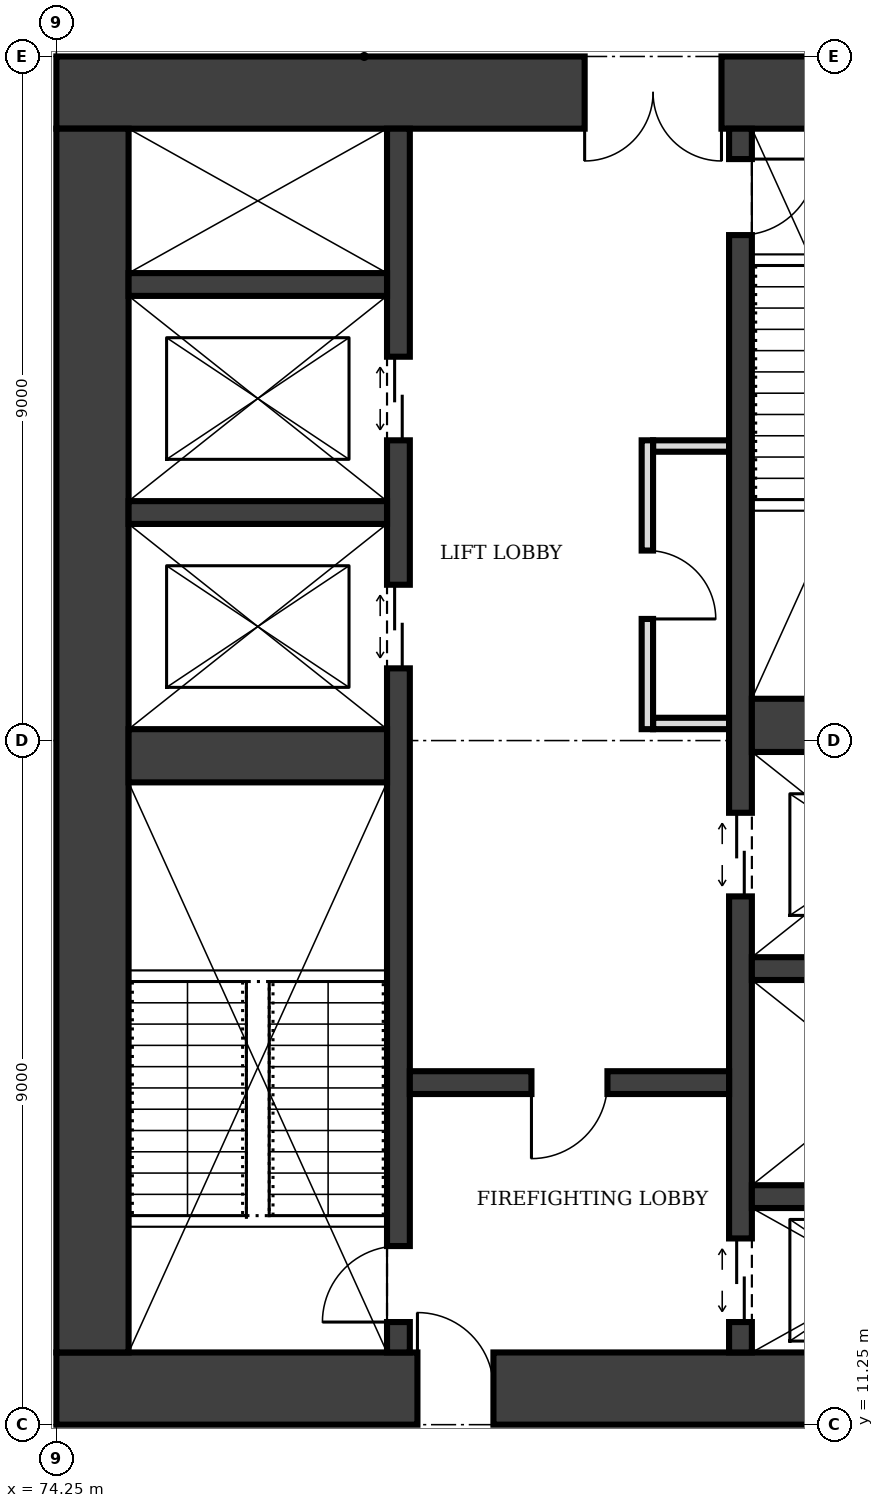
"""IFC4 building model, lengths in metres.
Left out: names, types, materials, properties, quantities, classifications, styles, units other than length and angle.
Written with IfcOpenShell. Run it as: python <this file> out.ifc"""

import sys

from ifc_helpers import new_model, si_unit, direction, frame, frame_2d, origin, place, context, subcontext, project, spatial, rectangle, extrude, element, fill, save


model = new_model("IFC4")
c1 = context("Model", 3, precision=1e-05, world=origin(), true_north=direction((0.0, 1.0)))
c2 = subcontext(c1, "Body", "Model", "MODEL_VIEW")
j1 = project(units=[si_unit("LENGTHUNIT", "METRE"), si_unit("PLANEANGLEUNIT", "RADIAN")], contexts=[c1])
p1 = place(None, origin())
s1 = spatial("IfcSite", under=j1, at=p1, CompositionType="ELEMENT")
p2 = place(p1, origin())
s2 = spatial("IfcBuilding", under=s1, at=p2, CompositionType="ELEMENT")
p3 = place(p2, frame((0.0, 0.0, 53.0)))
s3 = spatial("IfcBuildingStorey", under=s2, at=p3, CompositionType="ELEMENT", Elevation=53.0)
p4 = place(p3, frame((74.25, 11.725, 0.0), z_axis=(0.0, 0.0, 1.0), x_axis=(1.0, 0.0, 0.0)))
e1 = element("IfcWall", 1, at=p4, inside=s3, PredefinedType="SHEAR", context=c2, shape_type="SweptSolid", body=[
    extrude(rectangle(XDim=13.5, YDim=0.95, at=frame_2d((6.75, 0.0))), origin(), (0.0, 0.0, 1.0), 4.0),
])
p5 = place(p4, frame((4.75, 0.0, 0.0)))
e2 = element("IfcOpeningElement", 2, at=p5, cuts=e1, PredefinedType="OPENING", context=c2, shape_type="SweptSolid", body=[
    extrude(rectangle(XDim=1.0, YDim=2.1, at=frame_2d((0.5, 1.05))), frame((0.0, 0.485, 0.0), z_axis=(0.0, -1.0, 0.0), x_axis=(1.0, 0.0, 0.0)), (0.0, 0.0, 1.0), 0.97),
])
p6 = place(p3, frame((87.75, 28.775, 0.0), z_axis=(0.0, 0.0, 1.0), x_axis=(-1.0, 0.0, 0.0)))
e3 = element("IfcWall", 3, at=p6, inside=s3, PredefinedType="SHEAR", context=c2, shape_type="SweptSolid", body=[
    extrude(rectangle(XDim=13.5, YDim=0.95, at=frame_2d((6.75, 0.0))), origin(), (0.0, 0.0, 1.0), 4.0),
])
p7 = place(p6, frame((4.75, 0.0, 0.0)))
e4 = element("IfcOpeningElement", 4, at=p7, cuts=e3, PredefinedType="OPENING", context=c2, shape_type="SweptSolid", body=[
    extrude(rectangle(XDim=1.8, YDim=2.1, at=frame_2d((0.9, 1.05))), frame((0.0, 0.485, 0.0), z_axis=(0.0, -1.0, 0.0), x_axis=(1.0, 0.0, 0.0)), (0.0, 0.0, 1.0), 0.97),
])
p8 = place(p3, frame((74.725, 28.3, 0.0), z_axis=(0.0, 0.0, 1.0), x_axis=(0.0, -1.0, 0.0)))
e5 = element("IfcWall", 5, at=p8, inside=s3, PredefinedType="SHEAR", context=c2, shape_type="SweptSolid", body=[
    extrude(rectangle(XDim=16.1, YDim=0.95, at=frame_2d((8.05, 0.0))), origin(), (0.0, 0.0, 1.0), 4.0),
])
p9 = place(p3, frame((78.75, 12.2, 0.0), z_axis=(0.0, 0.0, 1.0), x_axis=(0.0, 1.0, 0.0)))
e6 = element("IfcWall", 6, at=p9, inside=s3, PredefinedType="SHEAR", context=c2, shape_type="SweptSolid", body=[
    extrude(rectangle(XDim=16.1, YDim=0.3, at=frame_2d((8.05, 0.0))), origin(), (0.0, 0.0, 1.0), 4.0),
])
p10 = place(p9, frame((0.4, 0.0, 0.0)))
e7 = element("IfcOpeningElement", 7, at=p10, cuts=e6, PredefinedType="OPENING", context=c2, shape_type="SweptSolid", body=[
    extrude(rectangle(XDim=1.0, YDim=2.1, at=frame_2d((0.5, 1.05))), frame((0.0, 0.16, 0.0), z_axis=(0.0, -1.0, 0.0), x_axis=(1.0, 0.0, 0.0)), (0.0, 0.0, 1.0), 0.32),
])
p11 = place(p9, frame((9.0, 0.0, 0.0)))
e8 = element("IfcOpeningElement", 8, at=p11, cuts=e6, PredefinedType="OPENING", context=c2, shape_type="SweptSolid", body=[
    extrude(rectangle(XDim=1.1, YDim=2.1, at=frame_2d((0.55, 1.05))), frame((0.0, 0.16, 0.0), z_axis=(0.0, -1.0, 0.0), x_axis=(1.0, 0.0, 0.0)), (0.0, 0.0, 1.0), 0.32),
])
p12 = place(p9, frame((12.0, 0.0, 0.0)))
e9 = element("IfcOpeningElement", 9, at=p12, cuts=e6, PredefinedType="OPENING", context=c2, shape_type="SweptSolid", body=[
    extrude(rectangle(XDim=1.1, YDim=2.1, at=frame_2d((0.55, 1.05))), frame((0.0, 0.16, 0.0), z_axis=(0.0, -1.0, 0.0), x_axis=(1.0, 0.0, 0.0)), (0.0, 0.0, 1.0), 0.32),
])
p13 = place(p3, frame((83.25, 12.2, 0.0), z_axis=(0.0, 0.0, 1.0), x_axis=(0.0, 1.0, 0.0)))
e10 = element("IfcWall", 10, at=p13, inside=s3, PredefinedType="SHEAR", context=c2, shape_type="SweptSolid", body=[
    extrude(rectangle(XDim=16.1, YDim=0.3, at=frame_2d((8.05, 0.0))), origin(), (0.0, 0.0, 1.0), 4.0),
])
p14 = place(p13, frame((14.7, 0.0, 0.0)))
e11 = element("IfcOpeningElement", 11, at=p14, cuts=e10, PredefinedType="OPENING", context=c2, shape_type="SweptSolid", body=[
    extrude(rectangle(XDim=1.0, YDim=2.1, at=frame_2d((0.5, 1.05))), frame((0.0, 0.16, 0.0), z_axis=(0.0, -1.0, 0.0), x_axis=(1.0, 0.0, 0.0)), (0.0, 0.0, 1.0), 0.32),
])
p15 = place(p13, frame((0.4, 0.0, 0.0)))
e12 = element("IfcOpeningElement", 12, at=p15, cuts=e10, PredefinedType="OPENING", context=c2, shape_type="SweptSolid", body=[
    extrude(rectangle(XDim=1.1, YDim=2.1, at=frame_2d((0.55, 1.05))), frame((0.0, 0.16, 0.0), z_axis=(0.0, -1.0, 0.0), x_axis=(1.0, 0.0, 0.0)), (0.0, 0.0, 1.0), 0.32),
])
p16 = place(p13, frame((6.0, 0.0, 0.0)))
e13 = element("IfcOpeningElement", 13, at=p16, cuts=e10, PredefinedType="OPENING", context=c2, shape_type="SweptSolid", body=[
    extrude(rectangle(XDim=1.1, YDim=2.1, at=frame_2d((0.55, 1.05))), frame((0.0, 0.16, 0.0), z_axis=(0.0, -1.0, 0.0), x_axis=(1.0, 0.0, 0.0)), (0.0, 0.0, 1.0), 0.32),
])
p17 = place(p3, frame((75.2, 20.05, 0.0), z_axis=(0.0, 0.0, 1.0), x_axis=(1.0, 0.0, 0.0)))
e14 = element("IfcWall", 14, at=p17, inside=s3, PredefinedType="SHEAR", context=c2, shape_type="SweptSolid", body=[
    extrude(rectangle(XDim=3.4, YDim=0.7, at=frame_2d((1.7, 0.0))), origin(), (0.0, 0.0, 1.0), 4.0),
])
p18 = place(p3, frame((78.9, 15.75, 0.0), z_axis=(0.0, 0.0, 1.0), x_axis=(1.0, 0.0, 0.0)))
e15 = element("IfcWall", 15, at=p18, inside=s3, PredefinedType="SHEAR", context=c2, shape_type="SweptSolid", body=[
    extrude(rectangle(XDim=4.2, YDim=0.3, at=frame_2d((2.1, 0.0))), origin(), (0.0, 0.0, 1.0), 4.0),
])
p19 = place(p18, frame((1.6, 0.0, 0.0)))
e16 = element("IfcOpeningElement", 16, at=p19, cuts=e15, PredefinedType="OPENING", context=c2, shape_type="SweptSolid", body=[
    extrude(rectangle(XDim=1.0, YDim=2.1, at=frame_2d((0.5, 1.05))), frame((0.0, 0.16, 0.0), z_axis=(0.0, -1.0, 0.0), x_axis=(1.0, 0.0, 0.0)), (0.0, 0.0, 1.0), 0.32),
])
for number, where, z_axis, x_axis in (
    (17, (83.4, 14.25, 0.0), (0.0, 0.0, 1.0), (1.0, 0.0, 0.0)),
    (18, (83.4, 17.25, 0.0), (0.0, 0.0, 1.0), (1.0, 0.0, 0.0)),
):
    element("IfcWall", number, at=place(p3, frame(where, z_axis=z_axis, x_axis=x_axis)), inside=s3, PredefinedType="SHEAR", context=c2, shape_type="SweptSolid", body=[
        extrude(rectangle(XDim=3.4, YDim=0.3, at=frame_2d((1.7, 0.0))), origin(), (0.0, 0.0, 1.0), 4.0),
    ])
p20 = place(p3, frame((83.4, 20.45, 0.0), z_axis=(0.0, 0.0, 1.0), x_axis=(1.0, 0.0, 0.0)))
e19 = element("IfcWall", 19, at=p20, inside=s3, PredefinedType="SHEAR", context=c2, shape_type="SweptSolid", body=[
    extrude(rectangle(XDim=3.4, YDim=0.7, at=frame_2d((1.7, 0.0))), origin(), (0.0, 0.0, 1.0), 4.0),
])
for number, where, z_axis, x_axis in (
    (20, (75.2, 23.25, 0.0), (0.0, 0.0, 1.0), (1.0, 0.0, 0.0)),
    (21, (75.2, 26.25, 0.0), (0.0, 0.0, 1.0), (1.0, 0.0, 0.0)),
):
    element("IfcWall", number, at=place(p3, frame(where, z_axis=z_axis, x_axis=x_axis)), inside=s3, PredefinedType="SHEAR", context=c2, shape_type="SweptSolid", body=[
        extrude(rectangle(XDim=3.4, YDim=0.3, at=frame_2d((1.7, 0.0))), origin(), (0.0, 0.0, 1.0), 4.0),
    ])
p21 = place(p3, frame((82.025, 20.4, 0.0), z_axis=(0.0, 0.0, 1.0), x_axis=(0.0, 1.0, 0.0)))
e22 = element("IfcWall", 22, at=p21, inside=s3, PredefinedType="PARTITIONING", context=c2, shape_type="SweptSolid", body=[
    extrude(rectangle(XDim=3.8, YDim=0.15, at=frame_2d((1.9, 0.0))), origin(), (0.0, 0.0, 1.0), 3.75),
])
p22 = place(p21, frame((1.45, 0.0, 0.0)))
e23 = element("IfcOpeningElement", 23, at=p22, cuts=e22, PredefinedType="OPENING", context=c2, shape_type="SweptSolid", body=[
    extrude(rectangle(XDim=0.9, YDim=2.1, at=frame_2d((0.45, 1.05))), frame((0.0, 0.085, 0.0), z_axis=(0.0, -1.0, 0.0), x_axis=(1.0, 0.0, 0.0)), (0.0, 0.0, 1.0), 0.17),
])
for number, where, z_axis, x_axis in (
    (24, (82.1, 20.475, 0.0), (0.0, 0.0, 1.0), (1.0, 0.0, 0.0)),
    (25, (82.1, 24.125, 0.0), (0.0, 0.0, 1.0), (1.0, 0.0, 0.0)),
):
    element("IfcWall", number, at=place(p3, frame(where, z_axis=z_axis, x_axis=x_axis)), inside=s3, PredefinedType="PARTITIONING", context=c2, shape_type="SweptSolid", body=[
        extrude(rectangle(XDim=1.0, YDim=0.15, at=frame_2d((0.5, 0.0))), origin(), (0.0, 0.0, 1.0), 3.75),
    ])
p23 = place(p5, origin())
e26 = element("IfcDoor", 26, at=p23, inside=s3, OperationType="SINGLE_SWING_LEFT", PredefinedType="DOOR", context=c2, shape_type="SweptSolid", body=[
    extrude(rectangle(XDim=1.0, YDim=2.1, at=frame_2d((0.5, 1.05))), frame((0.0, 0.025, 0.0), z_axis=(0.0, -1.0, 0.0), x_axis=(1.0, 0.0, 0.0)), (0.0, 0.0, 1.0), 0.05),
])
fill(e2, e26)
p24 = place(p7, origin())
e27 = element("IfcDoor", 27, at=p24, inside=s3, OperationType="DOUBLE_DOOR_SINGLE_SWING", PredefinedType="DOOR", context=c2, shape_type="SweptSolid", body=[
    extrude(rectangle(XDim=1.8, YDim=2.1, at=frame_2d((0.9, 1.05))), frame((0.0, 0.025, 0.0), z_axis=(0.0, -1.0, 0.0), x_axis=(1.0, 0.0, 0.0)), (0.0, 0.0, 1.0), 0.05),
])
fill(e4, e27)
p25 = place(p19, frame((1.0, 0.0, 0.0), z_axis=(0.0, 0.0, 1.0), x_axis=(-1.0, 0.0, 0.0)))
e28 = element("IfcDoor", 28, at=p25, inside=s3, OperationType="SINGLE_SWING_RIGHT", PredefinedType="DOOR", context=c2, shape_type="SweptSolid", body=[
    extrude(rectangle(XDim=1.0, YDim=2.1, at=frame_2d((0.5, 1.05))), frame((0.0, 0.025, 0.0), z_axis=(0.0, -1.0, 0.0), x_axis=(1.0, 0.0, 0.0)), (0.0, 0.0, 1.0), 0.05),
])
fill(e16, e28)
p26 = place(p10, origin())
e29 = element("IfcDoor", 29, at=p26, inside=s3, OperationType="SINGLE_SWING_LEFT", PredefinedType="DOOR", context=c2, shape_type="SweptSolid", body=[
    extrude(rectangle(XDim=1.0, YDim=2.1, at=frame_2d((0.5, 1.05))), frame((0.0, 0.025, 0.0), z_axis=(0.0, -1.0, 0.0), x_axis=(1.0, 0.0, 0.0)), (0.0, 0.0, 1.0), 0.05),
])
fill(e7, e29)
p27 = place(p14, frame((1.0, 0.0, 0.0), z_axis=(0.0, 0.0, 1.0), x_axis=(-1.0, 0.0, 0.0)))
e30 = element("IfcDoor", 30, at=p27, inside=s3, OperationType="SINGLE_SWING_LEFT", PredefinedType="DOOR", context=c2, shape_type="SweptSolid", body=[
    extrude(rectangle(XDim=1.0, YDim=2.1, at=frame_2d((0.5, 1.05))), frame((0.0, 0.025, 0.0), z_axis=(0.0, -1.0, 0.0), x_axis=(1.0, 0.0, 0.0)), (0.0, 0.0, 1.0), 0.05),
])
fill(e11, e30)
p28 = place(p15, origin())
e31 = element("IfcDoor", 31, at=p28, inside=s3, OperationType="DOUBLE_DOOR_SLIDING", PredefinedType="DOOR", context=c2, shape_type="SweptSolid", body=[
    extrude(rectangle(XDim=1.1, YDim=2.1, at=frame_2d((0.55, 1.05))), frame((0.0, 0.025, 0.0), z_axis=(0.0, -1.0, 0.0), x_axis=(1.0, 0.0, 0.0)), (0.0, 0.0, 1.0), 0.05),
])
fill(e12, e31)
p29 = place(p11, origin())
e32 = element("IfcDoor", 32, at=p29, inside=s3, OperationType="DOUBLE_DOOR_SLIDING", PredefinedType="DOOR", context=c2, shape_type="SweptSolid", body=[
    extrude(rectangle(XDim=1.1, YDim=2.1, at=frame_2d((0.55, 1.05))), frame((0.0, 0.025, 0.0), z_axis=(0.0, -1.0, 0.0), x_axis=(1.0, 0.0, 0.0)), (0.0, 0.0, 1.0), 0.05),
])
fill(e8, e32)
p30 = place(p12, origin())
e33 = element("IfcDoor", 33, at=p30, inside=s3, OperationType="DOUBLE_DOOR_SLIDING", PredefinedType="DOOR", context=c2, shape_type="SweptSolid", body=[
    extrude(rectangle(XDim=1.1, YDim=2.1, at=frame_2d((0.55, 1.05))), frame((0.0, 0.025, 0.0), z_axis=(0.0, -1.0, 0.0), x_axis=(1.0, 0.0, 0.0)), (0.0, 0.0, 1.0), 0.05),
])
fill(e9, e33)
p31 = place(p16, origin())
e34 = element("IfcDoor", 34, at=p31, inside=s3, OperationType="DOUBLE_DOOR_SLIDING", PredefinedType="DOOR", context=c2, shape_type="SweptSolid", body=[
    extrude(rectangle(XDim=1.1, YDim=2.1, at=frame_2d((0.55, 1.05))), frame((0.0, 0.025, 0.0), z_axis=(0.0, -1.0, 0.0), x_axis=(1.0, 0.0, 0.0)), (0.0, 0.0, 1.0), 0.05),
])
fill(e13, e34)
p32 = place(p22, frame((0.9, 0.0, 0.0), z_axis=(0.0, 0.0, 1.0), x_axis=(-1.0, 0.0, 0.0)))
e35 = element("IfcDoor", 35, at=p32, inside=s3, OperationType="SINGLE_SWING_RIGHT", PredefinedType="DOOR", context=c2, shape_type="SweptSolid", body=[
    extrude(rectangle(XDim=0.9, YDim=2.1, at=frame_2d((0.45, 1.05))), frame((0.0, 0.025, 0.0), z_axis=(0.0, -1.0, 0.0), x_axis=(1.0, 0.0, 0.0)), (0.0, 0.0, 1.0), 0.05),
])
fill(e23, e35)
save(model, sys.argv[1])
